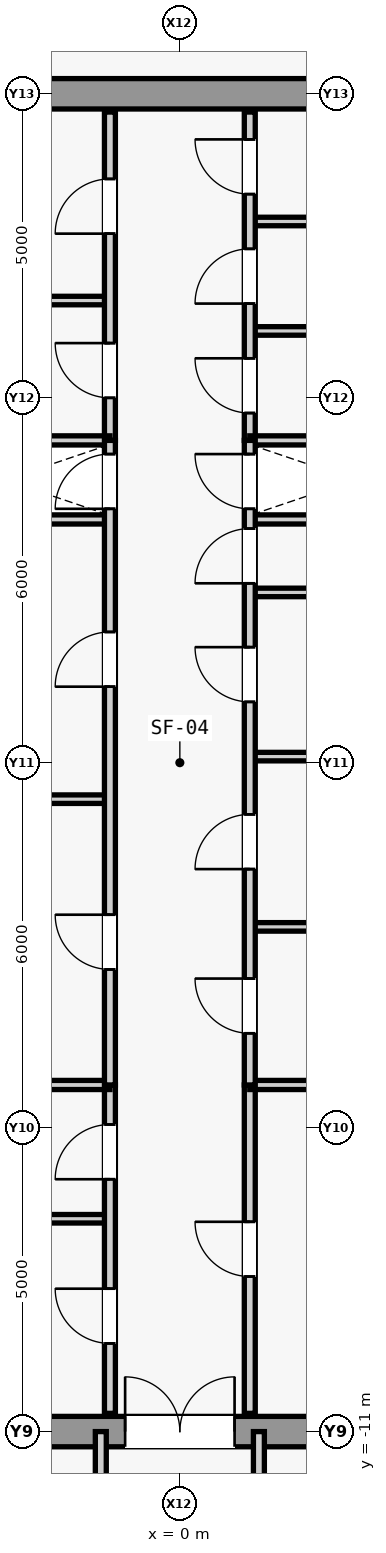
"""IFC4 building model, lengths in metres.
Left out: names, types, materials, properties, quantities, classifications, styles, units other than length and angle.
Written with IfcOpenShell. Run it as: python <this file> out.ifc"""

import sys

from ifc_helpers import new_model, si_unit, direction, frame, frame_2d, origin, place, context, subcontext, project, spatial, rectangle, extrude, source, transform, mapped, element, fill, save


model = new_model("IFC4")
c1 = context("Model", 3, precision=1e-05, world=origin(), true_north=direction((0.0, 1.0)))
c2 = subcontext(c1, "Body", "Model", "MODEL_VIEW")
j1 = project(units=[si_unit("LENGTHUNIT", "METRE"), si_unit("PLANEANGLEUNIT", "RADIAN")], contexts=[c1])
p1 = place(None, origin())
s1 = spatial("IfcSite", under=j1, at=p1, CompositionType="ELEMENT")
p2 = place(p1, origin())
s2 = spatial("IfcBuilding", under=s1, at=p2, CompositionType="ELEMENT")
p3 = place(p2, frame((0.0, 0.0, 326.3)))
s3 = spatial("IfcBuildingStorey", under=s2, at=p3, CompositionType="ELEMENT", Elevation=326.3)
m1 = source(origin(), c2, "Body", "SweptSolid", [
    extrude(rectangle(XDim=9.2, YDim=0.5, at=frame_2d((4.6, 0.0))), origin(), (0.0, 0.0, 1.0), 3.74),
])
p4 = place(p3, frame((-4.6, -11.0, 0.0), z_axis=(0.0, 0.0, 1.0), x_axis=(1.0, 0.0, 0.0)))
e1 = element("IfcWall", 1, at=p4, inside=s3, PredefinedType="SHEAR", context=c2, shape_type="MappedRepresentation", body=[
    mapped(m1, transform((0.0, 0.0, 0.0), scale=1.0)),
])
m2 = source(origin(), c2, "Body", "SweptSolid", [
    extrude(rectangle(XDim=1.8, YDim=2.25, at=frame_2d((0.9, 1.125))), frame((0.0, 0.26, 0.0), z_axis=(0.0, -1.0, 0.0), x_axis=(1.0, 0.0, 0.0)), (0.0, 0.0, 1.0), 0.52),
])
p5 = place(p4, frame((3.7, 0.0, 0.0)))
e2 = element("IfcOpeningElement", 2, at=p5, cuts=e1, PredefinedType="OPENING", context=c2, shape_type="MappedRepresentation", body=[
    mapped(m2, transform((0.0, 0.0, 0.0), scale=1.0)),
])
p6 = place(p3, frame((-4.6, 11.0, 0.0), z_axis=(0.0, 0.0, 1.0), x_axis=(1.0, 0.0, 0.0)))
e3 = element("IfcWall", 3, at=p6, inside=s3, PredefinedType="SHEAR", context=c2, shape_type="MappedRepresentation", body=[
    mapped(m1, transform((0.0, 0.0, 0.0), scale=1.0)),
])
m3 = source(origin(), c2, "Body", "SweptSolid", [
    extrude(rectangle(XDim=3.45, YDim=0.15, at=frame_2d((1.725, 0.0))), origin(), (0.0, 0.0, 1.0), 3.74),
])
for number, where, z_axis, x_axis in (
    (4, (-4.6, 4.0, 0.0), (0.0, 0.0, 1.0), (1.0, 0.0, 0.0)),
    (5, (1.15, 4.0, 0.0), (0.0, 0.0, 1.0), (1.0, 0.0, 0.0)),
):
    element("IfcWall", number, at=place(p3, frame(where, z_axis=z_axis, x_axis=x_axis)), inside=s3, PredefinedType="PARTITIONING", context=c2, shape_type="MappedRepresentation", body=[
        mapped(m3, transform((0.0, 0.0, 0.0), scale=1.0)),
    ])
m4 = source(origin(), c2, "Body", "SweptSolid", [
    extrude(rectangle(XDim=3.45, YDim=0.14, at=frame_2d((1.725, 0.0))), origin(), (0.0, 0.0, 1.0), 3.74),
])
p7 = place(p3, frame((-4.6, -7.5, 0.0), z_axis=(0.0, 0.0, 1.0), x_axis=(1.0, 0.0, 0.0)))
e6 = element("IfcWall", 6, at=p7, inside=s3, PredefinedType="PARTITIONING", context=c2, shape_type="MappedRepresentation", body=[
    mapped(m4, transform((0.0, 0.0, 0.0), scale=1.0)),
])
m5 = source(origin(), c2, "Body", "SweptSolid", [
    extrude(rectangle(XDim=5.4, YDim=0.18, at=frame_2d((2.7, 0.0))), origin(), (0.0, 0.0, 1.0), 3.74),
])
p8 = place(p3, frame((-1.15, -10.7, 0.0), z_axis=(0.0, 0.0, 1.0), x_axis=(0.0, 1.0, 0.0)))
e7 = element("IfcWall", 7, at=p8, inside=s3, PredefinedType="PARTITIONING", context=c2, shape_type="MappedRepresentation", body=[
    mapped(m5, transform((0.0, 0.0, 0.0), scale=1.0)),
])
m6 = source(origin(), c2, "Body", "SweptSolid", [
    extrude(rectangle(XDim=0.9, YDim=2.15, at=frame_2d((0.45, 1.075))), frame((0.0, 0.1, 0.0), z_axis=(0.0, -1.0, 0.0), x_axis=(1.0, 0.0, 0.0)), (0.0, 0.0, 1.0), 0.2),
])
p9 = place(p8, frame((1.15, 0.0, 0.0)))
e8 = element("IfcOpeningElement", 8, at=p9, cuts=e7, PredefinedType="OPENING", context=c2, shape_type="MappedRepresentation", body=[
    mapped(m6, transform((0.0, 0.0, 0.0), scale=1.0)),
])
p10 = place(p8, frame((3.85, 0.0, 0.0)))
e9 = element("IfcOpeningElement", 9, at=p10, cuts=e7, PredefinedType="OPENING", context=c2, shape_type="MappedRepresentation", body=[
    mapped(m6, transform((0.0, 0.0, 0.0), scale=1.0)),
])
p11 = place(p3, frame((1.15, -10.7, 0.0), z_axis=(0.0, 0.0, 1.0), x_axis=(0.0, 1.0, 0.0)))
e10 = element("IfcWall", 10, at=p11, inside=s3, PredefinedType="PARTITIONING", context=c2, shape_type="MappedRepresentation", body=[
    mapped(m5, transform((0.0, 0.0, 0.0), scale=1.0)),
])
p12 = place(p11, frame((2.25, 0.0, 0.0)))
e11 = element("IfcOpeningElement", 11, at=p12, cuts=e10, PredefinedType="OPENING", context=c2, shape_type="MappedRepresentation", body=[
    mapped(m6, transform((0.0, 0.0, 0.0), scale=1.0)),
])
for number, where, z_axis, x_axis in (
    (12, (-4.6, -5.3, 0.0), (0.0, 0.0, 1.0), (1.0, 0.0, 0.0)),
    (13, (1.15, -5.3, 0.0), (0.0, 0.0, 1.0), (1.0, 0.0, 0.0)),
):
    element("IfcWall", number, at=place(p3, frame(where, z_axis=z_axis, x_axis=x_axis)), inside=s3, PredefinedType="PARTITIONING", context=c2, shape_type="MappedRepresentation", body=[
        mapped(m3, transform((0.0, 0.0, 0.0), scale=1.0)),
    ])
p13 = place(p3, frame((-4.6, 7.6, 0.0), z_axis=(0.0, 0.0, 1.0), x_axis=(1.0, 0.0, 0.0)))
e14 = element("IfcWall", 14, at=p13, inside=s3, PredefinedType="PARTITIONING", context=c2, shape_type="MappedRepresentation", body=[
    mapped(m4, transform((0.0, 0.0, 0.0), scale=1.0)),
])
p14 = place(p3, frame((-1.15, 5.3, 0.0), z_axis=(0.0, 0.0, 1.0), x_axis=(0.0, 1.0, 0.0)))
e15 = element("IfcWall", 15, at=p14, inside=s3, PredefinedType="PARTITIONING", context=c2, shape_type="MappedRepresentation", body=[
    mapped(m5, transform((0.0, 0.0, 0.0), scale=1.0)),
])
p15 = place(p14, frame((0.7, 0.0, 0.0)))
e16 = element("IfcOpeningElement", 16, at=p15, cuts=e15, PredefinedType="OPENING", context=c2, shape_type="MappedRepresentation", body=[
    mapped(m6, transform((0.0, 0.0, 0.0), scale=1.0)),
])
p16 = place(p14, frame((3.4, 0.0, 0.0)))
e17 = element("IfcOpeningElement", 17, at=p16, cuts=e15, PredefinedType="OPENING", context=c2, shape_type="MappedRepresentation", body=[
    mapped(m6, transform((0.0, 0.0, 0.0), scale=1.0)),
])
for number, where, z_axis, x_axis in (
    (18, (1.15, 7.1, 0.0), (0.0, 0.0, 1.0), (1.0, 0.0, 0.0)),
    (19, (1.15, 8.9, 0.0), (0.0, 0.0, 1.0), (1.0, 0.0, 0.0)),
):
    element("IfcWall", number, at=place(p3, frame(where, z_axis=z_axis, x_axis=x_axis)), inside=s3, PredefinedType="PARTITIONING", context=c2, shape_type="MappedRepresentation", body=[
        mapped(m4, transform((0.0, 0.0, 0.0), scale=1.0)),
    ])
p17 = place(p3, frame((1.15, 5.3, 0.0), z_axis=(0.0, 0.0, 1.0), x_axis=(0.0, 1.0, 0.0)))
e20 = element("IfcWall", 20, at=p17, inside=s3, PredefinedType="PARTITIONING", context=c2, shape_type="MappedRepresentation", body=[
    mapped(m5, transform((0.0, 0.0, 0.0), scale=1.0)),
])
p18 = place(p17, frame((0.45, 0.0, 0.0)))
e21 = element("IfcOpeningElement", 21, at=p18, cuts=e20, PredefinedType="OPENING", context=c2, shape_type="MappedRepresentation", body=[
    mapped(m6, transform((0.0, 0.0, 0.0), scale=1.0)),
])
p19 = place(p17, frame((2.25, 0.0, 0.0)))
e22 = element("IfcOpeningElement", 22, at=p19, cuts=e20, PredefinedType="OPENING", context=c2, shape_type="MappedRepresentation", body=[
    mapped(m6, transform((0.0, 0.0, 0.0), scale=1.0)),
])
p20 = place(p17, frame((4.05, 0.0, 0.0)))
e23 = element("IfcOpeningElement", 23, at=p20, cuts=e20, PredefinedType="OPENING", context=c2, shape_type="MappedRepresentation", body=[
    mapped(m6, transform((0.0, 0.0, 0.0), scale=1.0)),
])
for number, where, z_axis, x_axis in (
    (24, (-4.6, 5.3, 0.0), (0.0, 0.0, 1.0), (1.0, 0.0, 0.0)),
    (25, (1.15, 5.3, 0.0), (0.0, 0.0, 1.0), (1.0, 0.0, 0.0)),
):
    element("IfcWall", number, at=place(p3, frame(where, z_axis=z_axis, x_axis=x_axis)), inside=s3, PredefinedType="PARTITIONING", context=c2, shape_type="MappedRepresentation", body=[
        mapped(m3, transform((0.0, 0.0, 0.0), scale=1.0)),
    ])
p21 = place(p3, frame((-4.6, -0.6, 0.0), z_axis=(0.0, 0.0, 1.0), x_axis=(1.0, 0.0, 0.0)))
e26 = element("IfcWall", 26, at=p21, inside=s3, PredefinedType="PARTITIONING", context=c2, shape_type="MappedRepresentation", body=[
    mapped(m4, transform((0.0, 0.0, 0.0), scale=1.0)),
])
m7 = source(origin(), c2, "Body", "SweptSolid", [
    extrude(rectangle(XDim=10.6, YDim=0.18, at=frame_2d((5.3, 0.0))), origin(), (0.0, 0.0, 1.0), 3.74),
])
p22 = place(p3, frame((-1.15, -5.3, 0.0), z_axis=(0.0, 0.0, 1.0), x_axis=(0.0, 1.0, 0.0)))
e27 = element("IfcWall", 27, at=p22, inside=s3, PredefinedType="PARTITIONING", context=c2, shape_type="MappedRepresentation", body=[
    mapped(m7, transform((0.0, 0.0, 0.0), scale=1.0)),
])
p23 = place(p22, frame((1.9, 0.0, 0.0)))
e28 = element("IfcOpeningElement", 28, at=p23, cuts=e27, PredefinedType="OPENING", context=c2, shape_type="MappedRepresentation", body=[
    mapped(m6, transform((0.0, 0.0, 0.0), scale=1.0)),
])
p24 = place(p22, frame((6.55, 0.0, 0.0)))
e29 = element("IfcOpeningElement", 29, at=p24, cuts=e27, PredefinedType="OPENING", context=c2, shape_type="MappedRepresentation", body=[
    mapped(m6, transform((0.0, 0.0, 0.0), scale=1.0)),
])
p25 = place(p22, frame((9.475, 0.0, 0.0)))
e30 = element("IfcOpeningElement", 30, at=p25, cuts=e27, PredefinedType="OPENING", context=c2, shape_type="MappedRepresentation", body=[
    mapped(m6, transform((0.0, 0.0, 0.0), scale=1.0)),
])
p26 = place(p3, frame((1.15, -2.7, 0.0), z_axis=(0.0, 0.0, 1.0), x_axis=(1.0, 0.0, 0.0)))
e31 = element("IfcWall", 31, at=p26, inside=s3, PredefinedType="PARTITIONING", context=c2, shape_type="MappedRepresentation", body=[
    mapped(m4, transform((0.0, 0.0, 0.0), scale=1.0)),
])
m8 = source(origin(), c2, "Body", "SweptSolid", [
    extrude(rectangle(XDim=3.45, YDim=0.14, at=frame_2d((1.725, 0.0))), origin(), (0.0, 0.0, 1.0), 3.045),
])
p27 = place(p3, frame((1.15, 0.1, 0.0), z_axis=(0.0, 0.0, 1.0), x_axis=(1.0, 0.0, 0.0)))
e32 = element("IfcWall", 32, at=p27, inside=s3, PredefinedType="PARTITIONING", context=c2, shape_type="MappedRepresentation", body=[
    mapped(m8, transform((0.0, 0.0, 0.0), scale=1.0)),
])
p28 = place(p3, frame((1.15, 2.8, 0.0), z_axis=(0.0, 0.0, 1.0), x_axis=(1.0, 0.0, 0.0)))
e33 = element("IfcWall", 33, at=p28, inside=s3, PredefinedType="PARTITIONING", context=c2, shape_type="MappedRepresentation", body=[
    mapped(m4, transform((0.0, 0.0, 0.0), scale=1.0)),
])
p29 = place(p3, frame((1.15, -5.3, 0.0), z_axis=(0.0, 0.0, 1.0), x_axis=(0.0, 1.0, 0.0)))
e34 = element("IfcWall", 34, at=p29, inside=s3, PredefinedType="PARTITIONING", context=c2, shape_type="MappedRepresentation", body=[
    mapped(m7, transform((0.0, 0.0, 0.0), scale=1.0)),
])
p30 = place(p29, frame((0.85, 0.0, 0.0)))
e35 = element("IfcOpeningElement", 35, at=p30, cuts=e34, PredefinedType="OPENING", context=c2, shape_type="MappedRepresentation", body=[
    mapped(m6, transform((0.0, 0.0, 0.0), scale=1.0)),
])
p31 = place(p29, frame((3.55, 0.0, 0.0)))
e36 = element("IfcOpeningElement", 36, at=p31, cuts=e34, PredefinedType="OPENING", context=c2, shape_type="MappedRepresentation", body=[
    mapped(m6, transform((0.0, 0.0, 0.0), scale=1.0)),
])
p32 = place(p29, frame((6.3, 0.0, 0.0)))
e37 = element("IfcOpeningElement", 37, at=p32, cuts=e34, PredefinedType="OPENING", context=c2, shape_type="MappedRepresentation", body=[
    mapped(m6, transform((0.0, 0.0, 0.0), scale=1.0)),
])
p33 = place(p29, frame((8.25, 0.0, 0.0)))
e38 = element("IfcOpeningElement", 38, at=p33, cuts=e34, PredefinedType="OPENING", context=c2, shape_type="MappedRepresentation", body=[
    mapped(m6, transform((0.0, 0.0, 0.0), scale=1.0)),
])
p34 = place(p29, frame((9.475, 0.0, 0.0)))
e39 = element("IfcOpeningElement", 39, at=p34, cuts=e34, PredefinedType="OPENING", context=c2, shape_type="MappedRepresentation", body=[
    mapped(m6, transform((0.0, 0.0, 0.0), scale=1.0)),
])
m9 = source(origin(), c2, "Body", "SweptSolid", [
    extrude(rectangle(XDim=6.0, YDim=0.18, at=frame_2d((3.0, 0.0))), origin(), (0.0, 0.0, 1.0), 3.74),
])
for number, where, z_axis, x_axis in (
    (40, (-1.3, -17.0, 0.0), (0.0, 0.0, 1.0), (0.0, 1.0, 0.0)),
    (41, (1.3, -17.0, 0.0), (0.0, 0.0, 1.0), (0.0, 1.0, 0.0)),
):
    element("IfcWall", number, at=place(p3, frame(where, z_axis=z_axis, x_axis=x_axis)), inside=s3, PredefinedType="PARTITIONING", context=c2, shape_type="MappedRepresentation", body=[
        mapped(m9, transform((0.0, 0.0, 0.0), scale=1.0)),
    ])
m10 = source(origin(), c2, "Body", "SweptSolid", [
    extrude(rectangle(XDim=0.9, YDim=2.15, at=frame_2d((0.45, 1.075))), frame((0.0, 0.025, 0.0), z_axis=(0.0, -1.0, 0.0), x_axis=(1.0, 0.0, 0.0)), (0.0, 0.0, 1.0), 0.05),
])
p35 = place(p9, origin())
e42 = element("IfcDoor", 42, at=p35, inside=s3, OperationType="SINGLE_SWING_RIGHT", PredefinedType="DOOR", context=c2, shape_type="MappedRepresentation", body=[
    mapped(m10, transform((0.0, 0.0, 0.0), scale=1.0)),
])
fill(e8, e42)
p36 = place(p10, origin())
e43 = element("IfcDoor", 43, at=p36, inside=s3, OperationType="SINGLE_SWING_LEFT", PredefinedType="DOOR", context=c2, shape_type="MappedRepresentation", body=[
    mapped(m10, transform((0.0, 0.0, 0.0), scale=1.0)),
])
fill(e9, e43)
p37 = place(p12, origin())
e44 = element("IfcDoor", 44, at=p37, inside=s3, OperationType="SINGLE_SWING_RIGHT", PredefinedType="DOOR", context=c2, shape_type="MappedRepresentation", body=[
    mapped(m10, transform((0.0, 0.0, 0.0), scale=1.0)),
])
fill(e11, e44)
m11 = source(origin(), c2, "Body", "SweptSolid", [
    extrude(rectangle(XDim=1.8, YDim=2.25, at=frame_2d((0.9, 1.125))), frame((0.0, 0.025, 0.0), z_axis=(0.0, -1.0, 0.0), x_axis=(1.0, 0.0, 0.0)), (0.0, 0.0, 1.0), 0.05),
])
p38 = place(p5, origin())
e45 = element("IfcDoor", 45, at=p38, inside=s3, OperationType="SINGLE_SWING_LEFT", PredefinedType="DOOR", context=c2, shape_type="MappedRepresentation", body=[
    mapped(m11, transform((0.0, 0.0, 0.0), scale=1.0)),
])
fill(e2, e45)
p39 = place(p15, origin())
e46 = element("IfcDoor", 46, at=p39, inside=s3, OperationType="SINGLE_SWING_RIGHT", PredefinedType="DOOR", context=c2, shape_type="MappedRepresentation", body=[
    mapped(m10, transform((0.0, 0.0, 0.0), scale=1.0)),
])
fill(e16, e46)
p40 = place(p16, origin())
e47 = element("IfcDoor", 47, at=p40, inside=s3, OperationType="SINGLE_SWING_LEFT", PredefinedType="DOOR", context=c2, shape_type="MappedRepresentation", body=[
    mapped(m10, transform((0.0, 0.0, 0.0), scale=1.0)),
])
fill(e17, e47)
p41 = place(p18, origin())
e48 = element("IfcDoor", 48, at=p41, inside=s3, OperationType="SINGLE_SWING_RIGHT", PredefinedType="DOOR", context=c2, shape_type="MappedRepresentation", body=[
    mapped(m10, transform((0.0, 0.0, 0.0), scale=1.0)),
])
fill(e21, e48)
p42 = place(p19, origin())
e49 = element("IfcDoor", 49, at=p42, inside=s3, OperationType="SINGLE_SWING_LEFT", PredefinedType="DOOR", context=c2, shape_type="MappedRepresentation", body=[
    mapped(m10, transform((0.0, 0.0, 0.0), scale=1.0)),
])
fill(e22, e49)
p43 = place(p20, origin())
e50 = element("IfcDoor", 50, at=p43, inside=s3, OperationType="SINGLE_SWING_RIGHT", PredefinedType="DOOR", context=c2, shape_type="MappedRepresentation", body=[
    mapped(m10, transform((0.0, 0.0, 0.0), scale=1.0)),
])
fill(e23, e50)
p44 = place(p23, origin())
e51 = element("IfcDoor", 51, at=p44, inside=s3, OperationType="SINGLE_SWING_RIGHT", PredefinedType="DOOR", context=c2, shape_type="MappedRepresentation", body=[
    mapped(m10, transform((0.0, 0.0, 0.0), scale=1.0)),
])
fill(e28, e51)
p45 = place(p24, origin())
e52 = element("IfcDoor", 52, at=p45, inside=s3, OperationType="SINGLE_SWING_LEFT", PredefinedType="DOOR", context=c2, shape_type="MappedRepresentation", body=[
    mapped(m10, transform((0.0, 0.0, 0.0), scale=1.0)),
])
fill(e29, e52)
p46 = place(p30, origin())
e53 = element("IfcDoor", 53, at=p46, inside=s3, OperationType="SINGLE_SWING_RIGHT", PredefinedType="DOOR", context=c2, shape_type="MappedRepresentation", body=[
    mapped(m10, transform((0.0, 0.0, 0.0), scale=1.0)),
])
fill(e35, e53)
p47 = place(p31, origin())
e54 = element("IfcDoor", 54, at=p47, inside=s3, OperationType="SINGLE_SWING_LEFT", PredefinedType="DOOR", context=c2, shape_type="MappedRepresentation", body=[
    mapped(m10, transform((0.0, 0.0, 0.0), scale=1.0)),
])
fill(e36, e54)
p48 = place(p32, origin())
e55 = element("IfcDoor", 55, at=p48, inside=s3, OperationType="SINGLE_SWING_RIGHT", PredefinedType="DOOR", context=c2, shape_type="MappedRepresentation", body=[
    mapped(m10, transform((0.0, 0.0, 0.0), scale=1.0)),
])
fill(e37, e55)
p49 = place(p33, origin())
e56 = element("IfcDoor", 56, at=p49, inside=s3, OperationType="SINGLE_SWING_LEFT", PredefinedType="DOOR", context=c2, shape_type="MappedRepresentation", body=[
    mapped(m10, transform((0.0, 0.0, 0.0), scale=1.0)),
])
fill(e38, e56)
p50 = place(p25, origin())
e57 = element("IfcDoor", 57, at=p50, inside=s3, OperationType="SINGLE_SWING_LEFT", PredefinedType="DOOR", context=c2, shape_type="MappedRepresentation", body=[
    mapped(m10, transform((0.0, 0.0, 0.0), scale=1.0)),
])
fill(e30, e57)
p51 = place(p34, origin())
e58 = element("IfcDoor", 58, at=p51, inside=s3, OperationType="SINGLE_SWING_RIGHT", PredefinedType="DOOR", context=c2, shape_type="MappedRepresentation", body=[
    mapped(m10, transform((0.0, 0.0, 0.0), scale=1.0)),
])
fill(e39, e58)
save(model, sys.argv[1])
